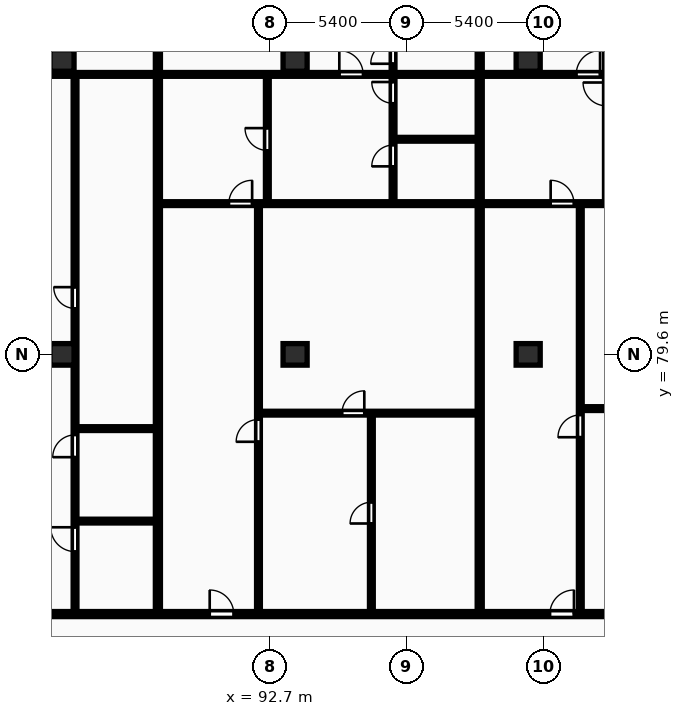
"""IFC4 building model, lengths in metres.
Left out: names, types, materials, properties, quantities, classifications, styles, units other than length and angle.
Written with IfcOpenShell. Run it as: python <this file> out.ifc"""

import sys

from ifc_helpers import new_model, si_unit, direction, frame, frame_2d, origin, origin_2d, place, context, subcontext, project, spatial, rectangle, extrude, element, fill, save


model = new_model("IFC4")
c1 = context("Model", 3, precision=1e-05, world=origin(), true_north=direction((0.0, 1.0)))
c2 = subcontext(c1, "Body", "Model", "MODEL_VIEW")
j1 = project(units=[si_unit("LENGTHUNIT", "METRE"), si_unit("PLANEANGLEUNIT", "RADIAN")], contexts=[c1])
p1 = place(None, origin())
s1 = spatial("IfcSite", under=j1, at=p1, CompositionType="ELEMENT")
p2 = place(p1, origin())
s2 = spatial("IfcBuilding", under=s1, at=p2, CompositionType="ELEMENT")
p3 = place(p2, frame((0.0, 0.0, 87.3)))
s3 = spatial("IfcBuildingStorey", under=s2, at=p3, CompositionType="ELEMENT", Elevation=87.3)
for number, where, z_axis, x_axis in (
    (1, (84.5, 79.6, 0.0), (0.0, 0.0, 1.0), (1.0, 0.0, 0.0)),
    (2, (84.5, 91.2, 0.0), (0.0, 0.0, 1.0), (1.0, 0.0, 0.0)),
    (3, (93.7, 79.6, 0.0), (0.0, 0.0, 1.0), (1.0, 0.0, 0.0)),
    (4, (93.7, 91.2, 0.0), (0.0, 0.0, 1.0), (1.0, 0.0, 0.0)),
    (5, (102.9, 79.6, 0.0), (0.0, 0.0, 1.0), (1.0, 0.0, 0.0)),
    (6, (102.9, 91.2, 0.0), (0.0, 0.0, 1.0), (1.0, 0.0, 0.0)),
):
    element("IfcColumn", number, at=place(p3, frame(where, z_axis=z_axis, x_axis=x_axis)), inside=s3, PredefinedType="COLUMN", context=c2, shape_type="SweptSolid", body=[
        extrude(rectangle(XDim=0.95, YDim=0.85, at=origin_2d()), origin(), (0.0, 0.0, 1.0), 3.25),
    ])
p4 = place(p3, frame((88.285, 69.43, 0.0), z_axis=(0.0, 0.0, 1.0), x_axis=(0.0, 1.0, 0.0)))
e7 = element("IfcWall", 7, at=p4, inside=s3, PredefinedType="PARTITIONING", context=c2, shape_type="SweptSolid", body=[
    extrude(rectangle(XDim=26.47, YDim=0.2, at=frame_2d((13.235, 0.0))), origin(), (0.0, 0.0, 1.0), 2.97),
])
for number, where, z_axis, x_axis in (
    (8, (85.075, 73.02, 0.0), (0.0, 0.0, 1.0), (1.0, 0.0, 0.0)),
    (9, (85.075, 76.67, 0.0), (0.0, 0.0, 1.0), (1.0, 0.0, 0.0)),
):
    element("IfcWall", number, at=place(p3, frame(where, z_axis=z_axis, x_axis=x_axis)), inside=s3, PredefinedType="PARTITIONING", context=c2, shape_type="SweptSolid", body=[
        extrude(rectangle(XDim=3.13, YDim=0.15, at=frame_2d((1.565, 0.0))), origin(), (0.0, 0.0, 1.0), 2.97),
    ])
p5 = place(p3, frame((85.015, 69.41, 0.0), z_axis=(0.0, 0.0, 1.0), x_axis=(0.0, 1.0, 0.0)))
e10 = element("IfcWall", 10, at=p5, inside=s3, PredefinedType="PARTITIONING", context=c2, shape_type="SweptSolid", body=[
    extrude(rectangle(XDim=21.18, YDim=0.15, at=frame_2d((10.59, 0.0))), origin(), (0.0, 0.0, 1.0), 2.97),
])
p6 = place(p5, frame((2.406, 0.0, 0.0)))
e11 = element("IfcOpeningElement", 11, at=p6, cuts=e10, PredefinedType="OPENING", context=c2, shape_type="SweptSolid", body=[
    extrude(rectangle(XDim=0.96, YDim=2.1, at=frame_2d((0.48, 1.05))), frame((0.0, 0.085, 0.0), z_axis=(0.0, -1.0, 0.0), x_axis=(1.0, 0.0, 0.0)), (0.0, 0.0, 1.0), 0.17),
])
p7 = place(p5, frame((6.133, 0.0, 0.0)))
e12 = element("IfcOpeningElement", 12, at=p7, cuts=e10, PredefinedType="OPENING", context=c2, shape_type="SweptSolid", body=[
    extrude(rectangle(XDim=0.88, YDim=2.06, at=frame_2d((0.44, 1.03))), frame((0.0, 0.085, 0.0), z_axis=(0.0, -1.0, 0.0), x_axis=(1.0, 0.0, 0.0)), (0.0, 0.0, 1.0), 0.17),
])
p8 = place(p5, frame((12.003, 0.0, 0.0)))
e13 = element("IfcOpeningElement", 13, at=p8, cuts=e10, PredefinedType="OPENING", context=c2, shape_type="SweptSolid", body=[
    extrude(rectangle(XDim=0.84, YDim=2.04, at=frame_2d((0.42, 1.02))), frame((0.0, 0.085, 0.0), z_axis=(0.0, -1.0, 0.0), x_axis=(1.0, 0.0, 0.0)), (0.0, 0.0, 1.0), 0.17),
])
p9 = place(p3, frame((69.447, 90.65, 0.0), z_axis=(0.0, 0.0, 1.0), x_axis=(1.0, 0.0, 0.0)))
e14 = element("IfcWall", 14, at=p9, inside=s3, PredefinedType="PARTITIONING", context=c2, shape_type="SweptSolid", body=[
    extrude(rectangle(XDim=18.758, YDim=0.15, at=frame_2d((9.379, 0.0))), origin(), (0.0, 0.0, 1.0), 2.97),
])
p10 = place(p9, frame((3.965, 0.0, 0.0)))
e15 = element("IfcOpeningElement", 15, at=p10, cuts=e14, PredefinedType="OPENING", context=c2, shape_type="SweptSolid", body=[
    extrude(rectangle(XDim=0.94, YDim=2.1, at=frame_2d((0.47, 1.05))), frame((0.0, 0.085, 0.0), z_axis=(0.0, -1.0, 0.0), x_axis=(1.0, 0.0, 0.0)), (0.0, 0.0, 1.0), 0.17),
])
p11 = place(p9, frame((8.909, 0.0, 0.0)))
e16 = element("IfcOpeningElement", 16, at=p11, cuts=e14, PredefinedType="OPENING", context=c2, shape_type="SweptSolid", body=[
    extrude(rectangle(XDim=0.94, YDim=2.1, at=frame_2d((0.47, 1.05))), frame((0.0, 0.085, 0.0), z_axis=(0.0, -1.0, 0.0), x_axis=(1.0, 0.0, 0.0)), (0.0, 0.0, 1.0), 0.17),
])
p12 = place(p3, frame((100.987, 69.43, 0.0), z_axis=(0.0, 0.0, 1.0), x_axis=(0.0, 1.0, 0.0)))
e17 = element("IfcWall", 17, at=p12, inside=s3, PredefinedType="PARTITIONING", context=c2, shape_type="SweptSolid", body=[
    extrude(rectangle(XDim=26.47, YDim=0.2, at=frame_2d((13.235, 0.0))), origin(), (0.0, 0.0, 1.0), 2.97),
])
p13 = place(p3, frame((96.711, 69.41, 0.0), z_axis=(0.0, 0.0, 1.0), x_axis=(0.0, 1.0, 0.0)))
e18 = element("IfcWall", 18, at=p13, inside=s3, PredefinedType="PARTITIONING", context=c2, shape_type="SweptSolid", body=[
    extrude(rectangle(XDim=7.87, YDim=0.15, at=frame_2d((3.935, 0.0))), origin(), (0.0, 0.0, 1.0), 2.97),
])
p14 = place(p13, frame((3.515, 0.0, 0.0)))
e19 = element("IfcOpeningElement", 19, at=p14, cuts=e18, PredefinedType="OPENING", context=c2, shape_type="SweptSolid", body=[
    extrude(rectangle(XDim=0.84, YDim=2.04, at=frame_2d((0.42, 1.02))), frame((0.0, 0.085, 0.0), z_axis=(0.0, -1.0, 0.0), x_axis=(1.0, 0.0, 0.0)), (0.0, 0.0, 1.0), 0.17),
])
p15 = place(p3, frame((92.315, 77.28, 0.0), z_axis=(0.0, 0.0, 1.0), x_axis=(1.0, 0.0, 0.0)))
e20 = element("IfcWall", 20, at=p15, inside=s3, PredefinedType="PARTITIONING", context=c2, shape_type="SweptSolid", body=[
    extrude(rectangle(XDim=8.593, YDim=0.15, at=frame_2d((4.296, 0.0))), origin(), (0.0, 0.0, 1.0), 2.97),
])
p16 = place(p15, frame((3.237, 0.0, 0.0)))
e21 = element("IfcOpeningElement", 21, at=p16, cuts=e20, PredefinedType="OPENING", context=c2, shape_type="SweptSolid", body=[
    extrude(rectangle(XDim=0.88, YDim=2.06, at=frame_2d((0.44, 1.03))), frame((0.0, 0.085, 0.0), z_axis=(0.0, -1.0, 0.0), x_axis=(1.0, 0.0, 0.0)), (0.0, 0.0, 1.0), 0.17),
])
p17 = place(p3, frame((92.255, 69.41, 0.0), z_axis=(0.0, 0.0, 1.0), x_axis=(0.0, 1.0, 0.0)))
e22 = element("IfcWall", 22, at=p17, inside=s3, PredefinedType="PARTITIONING", context=c2, shape_type="SweptSolid", body=[
    extrude(rectangle(XDim=16.1, YDim=0.15, at=frame_2d((8.05, 0.0))), origin(), (0.0, 0.0, 1.0), 2.97),
])
p18 = place(p17, frame((6.74, 0.0, 0.0)))
e23 = element("IfcOpeningElement", 23, at=p18, cuts=e22, PredefinedType="OPENING", context=c2, shape_type="SweptSolid", body=[
    extrude(rectangle(XDim=0.88, YDim=2.06, at=frame_2d((0.44, 1.03))), frame((0.0, 0.085, 0.0), z_axis=(0.0, -1.0, 0.0), x_axis=(1.0, 0.0, 0.0)), (0.0, 0.0, 1.0), 0.17),
])
p19 = place(p3, frame((92.604, 85.59, 0.0), z_axis=(0.0, 0.0, 1.0), x_axis=(0.0, 1.0, 0.0)))
e24 = element("IfcWall", 24, at=p19, inside=s3, PredefinedType="PARTITIONING", context=c2, shape_type="SweptSolid", body=[
    extrude(rectangle(XDim=5.0, YDim=0.15, at=frame_2d((2.5, 0.0))), origin(), (0.0, 0.0, 1.0), 2.97),
])
p20 = place(p19, frame((2.06, 0.0, 0.0)))
e25 = element("IfcOpeningElement", 25, at=p20, cuts=e24, PredefinedType="OPENING", context=c2, shape_type="SweptSolid", body=[
    extrude(rectangle(XDim=0.88, YDim=2.06, at=frame_2d((0.44, 1.03))), frame((0.0, 0.085, 0.0), z_axis=(0.0, -1.0, 0.0), x_axis=(1.0, 0.0, 0.0)), (0.0, 0.0, 1.0), 0.17),
])
p21 = place(p3, frame((97.627, 88.09, 0.0), z_axis=(0.0, 0.0, 1.0), x_axis=(1.0, 0.0, 0.0)))
e26 = element("IfcWall", 26, at=p21, inside=s3, PredefinedType="PARTITIONING", context=c2, shape_type="SweptSolid", body=[
    extrude(rectangle(XDim=3.28, YDim=0.15, at=frame_2d((1.64, 0.0))), origin(), (0.0, 0.0, 1.0), 2.97),
])
p22 = place(p3, frame((97.567, 85.59, 0.0), z_axis=(0.0, 0.0, 1.0), x_axis=(0.0, 1.0, 0.0)))
e27 = element("IfcWall", 27, at=p22, inside=s3, PredefinedType="PARTITIONING", context=c2, shape_type="SweptSolid", body=[
    extrude(rectangle(XDim=10.31, YDim=0.15, at=frame_2d((5.155, 0.0))), origin(), (0.0, 0.0, 1.0), 2.97),
])
p23 = place(p22, frame((1.43, 0.0, 0.0)))
e28 = element("IfcOpeningElement", 28, at=p23, cuts=e27, PredefinedType="OPENING", context=c2, shape_type="SweptSolid", body=[
    extrude(rectangle(XDim=0.84, YDim=2.04, at=frame_2d((0.42, 1.02))), frame((0.0, 0.085, 0.0), z_axis=(0.0, -1.0, 0.0), x_axis=(1.0, 0.0, 0.0)), (0.0, 0.0, 1.0), 0.17),
])
p24 = place(p22, frame((3.92, 0.0, 0.0)))
e29 = element("IfcOpeningElement", 29, at=p24, cuts=e27, PredefinedType="OPENING", context=c2, shape_type="SweptSolid", body=[
    extrude(rectangle(XDim=0.84, YDim=2.04, at=frame_2d((0.42, 1.02))), frame((0.0, 0.085, 0.0), z_axis=(0.0, -1.0, 0.0), x_axis=(1.0, 0.0, 0.0)), (0.0, 0.0, 1.0), 0.17),
])
p25 = place(p22, frame((5.48, 0.0, 0.0)))
e30 = element("IfcOpeningElement", 30, at=p25, cuts=e27, PredefinedType="OPENING", context=c2, shape_type="SweptSolid", body=[
    extrude(rectangle(XDim=0.88, YDim=2.06, at=frame_2d((0.44, 1.03))), frame((0.0, 0.085, 0.0), z_axis=(0.0, -1.0, 0.0), x_axis=(1.0, 0.0, 0.0)), (0.0, 0.0, 1.0), 0.17),
])
p26 = place(p3, frame((88.365, 85.55, 0.0), z_axis=(0.0, 0.0, 1.0), x_axis=(1.0, 0.0, 0.0)))
e31 = element("IfcWall", 31, at=p26, inside=s3, PredefinedType="PARTITIONING", context=c2, shape_type="SweptSolid", body=[
    extrude(rectangle(XDim=12.543, YDim=0.15, at=frame_2d((6.271, 0.0))), origin(), (0.0, 0.0, 1.0), 2.97),
])
p27 = place(p26, frame((2.72, 0.0, 0.0)))
e32 = element("IfcOpeningElement", 32, at=p27, cuts=e31, PredefinedType="OPENING", context=c2, shape_type="SweptSolid", body=[
    extrude(rectangle(XDim=0.92, YDim=2.08, at=frame_2d((0.46, 1.04))), frame((0.0, 0.085, 0.0), z_axis=(0.0, -1.0, 0.0), x_axis=(1.0, 0.0, 0.0)), (0.0, 0.0, 1.0), 0.17),
])
p28 = place(p3, frame((88.365, 90.65, 0.0), z_axis=(0.0, 0.0, 1.0), x_axis=(1.0, 0.0, 0.0)))
e33 = element("IfcWall", 33, at=p28, inside=s3, PredefinedType="PARTITIONING", context=c2, shape_type="SweptSolid", body=[
    extrude(rectangle(XDim=12.543, YDim=0.15, at=frame_2d((6.271, 0.0))), origin(), (0.0, 0.0, 1.0), 2.97),
])
p29 = place(p28, frame((7.081, 0.0, 0.0)))
e34 = element("IfcOpeningElement", 34, at=p29, cuts=e33, PredefinedType="OPENING", context=c2, shape_type="SweptSolid", body=[
    extrude(rectangle(XDim=0.94, YDim=2.1, at=frame_2d((0.47, 1.05))), frame((0.0, 0.085, 0.0), z_axis=(0.0, -1.0, 0.0), x_axis=(1.0, 0.0, 0.0)), (0.0, 0.0, 1.0), 0.17),
])
p30 = place(p3, frame((105.017, 77.46, 0.0), z_axis=(0.0, 0.0, 1.0), x_axis=(1.0, 0.0, 0.0)))
e35 = element("IfcWall", 35, at=p30, inside=s3, PredefinedType="PARTITIONING", context=c2, shape_type="SweptSolid", body=[
    extrude(rectangle(XDim=12.936, YDim=0.15, at=frame_2d((6.468, 0.0))), origin(), (0.0, 0.0, 1.0), 2.97),
])
p31 = place(p30, frame((4.464, 0.0, 0.0)))
e36 = element("IfcOpeningElement", 36, at=p31, cuts=e35, PredefinedType="OPENING", context=c2, shape_type="SweptSolid", body=[
    extrude(rectangle(XDim=0.88, YDim=2.06, at=frame_2d((0.44, 1.03))), frame((0.0, 0.085, 0.0), z_axis=(0.0, -1.0, 0.0), x_axis=(1.0, 0.0, 0.0)), (0.0, 0.0, 1.0), 0.17),
])
p32 = place(p3, frame((104.957, 69.41, 0.0), z_axis=(0.0, 0.0, 1.0), x_axis=(0.0, 1.0, 0.0)))
e37 = element("IfcWall", 37, at=p32, inside=s3, PredefinedType="PARTITIONING", context=c2, shape_type="SweptSolid", body=[
    extrude(rectangle(XDim=16.1, YDim=0.15, at=frame_2d((8.05, 0.0))), origin(), (0.0, 0.0, 1.0), 2.97),
])
p33 = place(p32, frame((6.92, 0.0, 0.0)))
e38 = element("IfcOpeningElement", 38, at=p33, cuts=e37, PredefinedType="OPENING", context=c2, shape_type="SweptSolid", body=[
    extrude(rectangle(XDim=0.88, YDim=2.06, at=frame_2d((0.44, 1.03))), frame((0.0, 0.085, 0.0), z_axis=(0.0, -1.0, 0.0), x_axis=(1.0, 0.0, 0.0)), (0.0, 0.0, 1.0), 0.17),
])
p34 = place(p3, frame((101.067, 85.55, 0.0), z_axis=(0.0, 0.0, 1.0), x_axis=(1.0, 0.0, 0.0)))
e39 = element("IfcWall", 39, at=p34, inside=s3, PredefinedType="PARTITIONING", context=c2, shape_type="SweptSolid", body=[
    extrude(rectangle(XDim=16.886, YDim=0.15, at=frame_2d((8.443, 0.0))), origin(), (0.0, 0.0, 1.0), 2.97),
])
p35 = place(p34, frame((2.72, 0.0, 0.0)))
e40 = element("IfcOpeningElement", 40, at=p35, cuts=e39, PredefinedType="OPENING", context=c2, shape_type="SweptSolid", body=[
    extrude(rectangle(XDim=0.92, YDim=2.08, at=frame_2d((0.46, 1.04))), frame((0.0, 0.085, 0.0), z_axis=(0.0, -1.0, 0.0), x_axis=(1.0, 0.0, 0.0)), (0.0, 0.0, 1.0), 0.17),
])
p36 = place(p3, frame((101.067, 90.65, 0.0), z_axis=(0.0, 0.0, 1.0), x_axis=(1.0, 0.0, 0.0)))
e41 = element("IfcWall", 41, at=p36, inside=s3, PredefinedType="PARTITIONING", context=c2, shape_type="SweptSolid", body=[
    extrude(rectangle(XDim=12.913, YDim=0.15, at=frame_2d((6.457, 0.0))), origin(), (0.0, 0.0, 1.0), 2.97),
])
p37 = place(p36, frame((3.73, 0.0, 0.0)))
e42 = element("IfcOpeningElement", 42, at=p37, cuts=e41, PredefinedType="OPENING", context=c2, shape_type="SweptSolid", body=[
    extrude(rectangle(XDim=0.94, YDim=2.1, at=frame_2d((0.47, 1.05))), frame((0.0, 0.085, 0.0), z_axis=(0.0, -1.0, 0.0), x_axis=(1.0, 0.0, 0.0)), (0.0, 0.0, 1.0), 0.17),
])
p38 = place(p36, frame((6.016, 0.0, 0.0)))
e43 = element("IfcOpeningElement", 43, at=p38, cuts=e41, PredefinedType="OPENING", context=c2, shape_type="SweptSolid", body=[
    extrude(rectangle(XDim=0.88, YDim=2.06, at=frame_2d((0.44, 1.03))), frame((0.0, 0.085, 0.0), z_axis=(0.0, -1.0, 0.0), x_axis=(1.0, 0.0, 0.0)), (0.0, 0.0, 1.0), 0.17),
])
p39 = place(p36, frame((11.813, 0.0, 0.0)))
e44 = element("IfcOpeningElement", 44, at=p39, cuts=e41, PredefinedType="OPENING", context=c2, shape_type="SweptSolid", body=[
    extrude(rectangle(XDim=0.88, YDim=2.06, at=frame_2d((0.44, 1.03))), frame((0.0, 0.085, 0.0), z_axis=(0.0, -1.0, 0.0), x_axis=(1.0, 0.0, 0.0)), (0.0, 0.0, 1.0), 0.17),
])
p40 = place(p3, frame((57.6, 69.35, 0.0), z_axis=(0.0, 0.0, 1.0), x_axis=(1.0, 0.0, 0.0)))
e45 = element("IfcWall", 45, at=p40, inside=s3, PredefinedType="PARTITIONING", context=c2, shape_type="SweptSolid", body=[
    extrude(rectangle(XDim=73.0, YDim=0.2, at=frame_2d((36.5, 0.0))), origin(), (0.0, 0.0, 1.0), 2.97),
])
p41 = place(p40, frame((0.37, 0.0, 0.0)))
e46 = element("IfcOpeningElement", 46, at=p41, cuts=e45, PredefinedType="OPENING", context=c2, shape_type="SweptSolid", body=[
    extrude(rectangle(XDim=0.95, YDim=2.15, at=frame_2d((0.475, 1.075))), frame((0.0, 0.11, 0.0), z_axis=(0.0, -1.0, 0.0), x_axis=(1.0, 0.0, 0.0)), (0.0, 0.0, 1.0), 0.22),
])
p42 = place(p40, frame((20.421, 0.0, 0.0)))
e47 = element("IfcOpeningElement", 47, at=p42, cuts=e45, PredefinedType="OPENING", context=c2, shape_type="SweptSolid", body=[
    extrude(rectangle(XDim=1.22, YDim=2.18, at=frame_2d((0.61, 1.09))), frame((0.0, 0.11, 0.0), z_axis=(0.0, -1.0, 0.0), x_axis=(1.0, 0.0, 0.0)), (0.0, 0.0, 1.0), 0.22),
])
p43 = place(p40, frame((32.729, 0.0, 0.0)))
e48 = element("IfcOpeningElement", 48, at=p43, cuts=e45, PredefinedType="OPENING", context=c2, shape_type="SweptSolid", body=[
    extrude(rectangle(XDim=0.95, YDim=2.15, at=frame_2d((0.475, 1.075))), frame((0.0, 0.11, 0.0), z_axis=(0.0, -1.0, 0.0), x_axis=(1.0, 0.0, 0.0)), (0.0, 0.0, 1.0), 0.22),
])
p44 = place(p40, frame((46.157, 0.0, 0.0)))
e49 = element("IfcOpeningElement", 49, at=p44, cuts=e45, PredefinedType="OPENING", context=c2, shape_type="SweptSolid", body=[
    extrude(rectangle(XDim=0.95, YDim=2.15, at=frame_2d((0.475, 1.075))), frame((0.0, 0.11, 0.0), z_axis=(0.0, -1.0, 0.0), x_axis=(1.0, 0.0, 0.0)), (0.0, 0.0, 1.0), 0.22),
])
p45 = place(p40, frame((60.803, 0.0, 0.0)))
e50 = element("IfcOpeningElement", 50, at=p45, cuts=e45, PredefinedType="OPENING", context=c2, shape_type="SweptSolid", body=[
    extrude(rectangle(XDim=0.95, YDim=2.15, at=frame_2d((0.475, 1.075))), frame((0.0, 0.11, 0.0), z_axis=(0.0, -1.0, 0.0), x_axis=(1.0, 0.0, 0.0)), (0.0, 0.0, 1.0), 0.22),
])
p46 = place(p6, origin())
e51 = element("IfcDoor", 51, at=p46, inside=s3, OperationType="SINGLE_SWING_RIGHT", PredefinedType="DOOR", context=c2, shape_type="SweptSolid", body=[
    extrude(rectangle(XDim=0.96, YDim=2.1, at=frame_2d((0.48, 1.05))), frame((0.0, 0.025, 0.0), z_axis=(0.0, -1.0, 0.0), x_axis=(1.0, 0.0, 0.0)), (0.0, 0.0, 1.0), 0.05),
])
fill(e11, e51)
p47 = place(p7, origin())
e52 = element("IfcDoor", 52, at=p47, inside=s3, OperationType="SINGLE_SWING_LEFT", PredefinedType="DOOR", context=c2, shape_type="SweptSolid", body=[
    extrude(rectangle(XDim=0.88, YDim=2.06, at=frame_2d((0.44, 1.03))), frame((0.0, 0.025, 0.0), z_axis=(0.0, -1.0, 0.0), x_axis=(1.0, 0.0, 0.0)), (0.0, 0.0, 1.0), 0.05),
])
fill(e12, e52)
p48 = place(p8, origin())
e53 = element("IfcDoor", 53, at=p48, inside=s3, OperationType="SINGLE_SWING_RIGHT", PredefinedType="DOOR", context=c2, shape_type="SweptSolid", body=[
    extrude(rectangle(XDim=0.84, YDim=2.04, at=frame_2d((0.42, 1.02))), frame((0.0, 0.025, 0.0), z_axis=(0.0, -1.0, 0.0), x_axis=(1.0, 0.0, 0.0)), (0.0, 0.0, 1.0), 0.05),
])
fill(e13, e53)
p49 = place(p14, origin())
e54 = element("IfcDoor", 54, at=p49, inside=s3, OperationType="SINGLE_SWING_LEFT", PredefinedType="DOOR", context=c2, shape_type="SweptSolid", body=[
    extrude(rectangle(XDim=0.84, YDim=2.04, at=frame_2d((0.42, 1.02))), frame((0.0, 0.025, 0.0), z_axis=(0.0, -1.0, 0.0), x_axis=(1.0, 0.0, 0.0)), (0.0, 0.0, 1.0), 0.05),
])
fill(e19, e54)
p50 = place(p16, origin())
e55 = element("IfcDoor", 55, at=p50, inside=s3, OperationType="SINGLE_SWING_RIGHT", PredefinedType="DOOR", context=c2, shape_type="SweptSolid", body=[
    extrude(rectangle(XDim=0.88, YDim=2.06, at=frame_2d((0.44, 1.03))), frame((0.0, 0.025, 0.0), z_axis=(0.0, -1.0, 0.0), x_axis=(1.0, 0.0, 0.0)), (0.0, 0.0, 1.0), 0.05),
])
fill(e21, e55)
p51 = place(p18, origin())
e56 = element("IfcDoor", 56, at=p51, inside=s3, OperationType="SINGLE_SWING_LEFT", PredefinedType="DOOR", context=c2, shape_type="SweptSolid", body=[
    extrude(rectangle(XDim=0.88, YDim=2.06, at=frame_2d((0.44, 1.03))), frame((0.0, 0.025, 0.0), z_axis=(0.0, -1.0, 0.0), x_axis=(1.0, 0.0, 0.0)), (0.0, 0.0, 1.0), 0.05),
])
fill(e23, e56)
p52 = place(p20, origin())
e57 = element("IfcDoor", 57, at=p52, inside=s3, OperationType="SINGLE_SWING_RIGHT", PredefinedType="DOOR", context=c2, shape_type="SweptSolid", body=[
    extrude(rectangle(XDim=0.88, YDim=2.06, at=frame_2d((0.44, 1.03))), frame((0.0, 0.025, 0.0), z_axis=(0.0, -1.0, 0.0), x_axis=(1.0, 0.0, 0.0)), (0.0, 0.0, 1.0), 0.05),
])
fill(e25, e57)
p53 = place(p23, origin())
e58 = element("IfcDoor", 58, at=p53, inside=s3, OperationType="SINGLE_SWING_LEFT", PredefinedType="DOOR", context=c2, shape_type="SweptSolid", body=[
    extrude(rectangle(XDim=0.84, YDim=2.04, at=frame_2d((0.42, 1.02))), frame((0.0, 0.025, 0.0), z_axis=(0.0, -1.0, 0.0), x_axis=(1.0, 0.0, 0.0)), (0.0, 0.0, 1.0), 0.05),
])
fill(e28, e58)
p54 = place(p24, origin())
e59 = element("IfcDoor", 59, at=p54, inside=s3, OperationType="SINGLE_SWING_RIGHT", PredefinedType="DOOR", context=c2, shape_type="SweptSolid", body=[
    extrude(rectangle(XDim=0.84, YDim=2.04, at=frame_2d((0.42, 1.02))), frame((0.0, 0.025, 0.0), z_axis=(0.0, -1.0, 0.0), x_axis=(1.0, 0.0, 0.0)), (0.0, 0.0, 1.0), 0.05),
])
fill(e29, e59)
p55 = place(p25, origin())
e60 = element("IfcDoor", 60, at=p55, inside=s3, OperationType="SINGLE_SWING_LEFT", PredefinedType="DOOR", context=c2, shape_type="SweptSolid", body=[
    extrude(rectangle(XDim=0.88, YDim=2.06, at=frame_2d((0.44, 1.03))), frame((0.0, 0.025, 0.0), z_axis=(0.0, -1.0, 0.0), x_axis=(1.0, 0.0, 0.0)), (0.0, 0.0, 1.0), 0.05),
])
fill(e30, e60)
p56 = place(p27, origin())
e61 = element("IfcDoor", 61, at=p56, inside=s3, OperationType="SINGLE_SWING_RIGHT", PredefinedType="DOOR", context=c2, shape_type="SweptSolid", body=[
    extrude(rectangle(XDim=0.92, YDim=2.08, at=frame_2d((0.46, 1.04))), frame((0.0, 0.025, 0.0), z_axis=(0.0, -1.0, 0.0), x_axis=(1.0, 0.0, 0.0)), (0.0, 0.0, 1.0), 0.05),
])
fill(e32, e61)
p57 = place(p29, origin())
e62 = element("IfcDoor", 62, at=p57, inside=s3, OperationType="SINGLE_SWING_LEFT", PredefinedType="DOOR", context=c2, shape_type="SweptSolid", body=[
    extrude(rectangle(XDim=0.94, YDim=2.1, at=frame_2d((0.47, 1.05))), frame((0.0, 0.025, 0.0), z_axis=(0.0, -1.0, 0.0), x_axis=(1.0, 0.0, 0.0)), (0.0, 0.0, 1.0), 0.05),
])
fill(e34, e62)
p58 = place(p33, origin())
e63 = element("IfcDoor", 63, at=p58, inside=s3, OperationType="SINGLE_SWING_LEFT", PredefinedType="DOOR", context=c2, shape_type="SweptSolid", body=[
    extrude(rectangle(XDim=0.88, YDim=2.06, at=frame_2d((0.44, 1.03))), frame((0.0, 0.025, 0.0), z_axis=(0.0, -1.0, 0.0), x_axis=(1.0, 0.0, 0.0)), (0.0, 0.0, 1.0), 0.05),
])
fill(e38, e63)
p59 = place(p35, origin())
e64 = element("IfcDoor", 64, at=p59, inside=s3, OperationType="SINGLE_SWING_LEFT", PredefinedType="DOOR", context=c2, shape_type="SweptSolid", body=[
    extrude(rectangle(XDim=0.92, YDim=2.08, at=frame_2d((0.46, 1.04))), frame((0.0, 0.025, 0.0), z_axis=(0.0, -1.0, 0.0), x_axis=(1.0, 0.0, 0.0)), (0.0, 0.0, 1.0), 0.05),
])
fill(e40, e64)
p60 = place(p37, origin())
e65 = element("IfcDoor", 65, at=p60, inside=s3, OperationType="SINGLE_SWING_RIGHT", PredefinedType="DOOR", context=c2, shape_type="SweptSolid", body=[
    extrude(rectangle(XDim=0.94, YDim=2.1, at=frame_2d((0.47, 1.05))), frame((0.0, 0.025, 0.0), z_axis=(0.0, -1.0, 0.0), x_axis=(1.0, 0.0, 0.0)), (0.0, 0.0, 1.0), 0.05),
])
fill(e42, e65)
p61 = place(p43, origin())
e66 = element("IfcDoor", 66, at=p61, inside=s3, OperationType="SINGLE_SWING_LEFT", PredefinedType="DOOR", context=c2, shape_type="SweptSolid", body=[
    extrude(rectangle(XDim=0.95, YDim=2.15, at=frame_2d((0.475, 1.075))), frame((0.0, 0.025, 0.0), z_axis=(0.0, -1.0, 0.0), x_axis=(1.0, 0.0, 0.0)), (0.0, 0.0, 1.0), 0.05),
])
fill(e48, e66)
p62 = place(p44, origin())
e67 = element("IfcDoor", 67, at=p62, inside=s3, OperationType="SINGLE_SWING_RIGHT", PredefinedType="DOOR", context=c2, shape_type="SweptSolid", body=[
    extrude(rectangle(XDim=0.95, YDim=2.15, at=frame_2d((0.475, 1.075))), frame((0.0, 0.025, 0.0), z_axis=(0.0, -1.0, 0.0), x_axis=(1.0, 0.0, 0.0)), (0.0, 0.0, 1.0), 0.05),
])
fill(e49, e67)
save(model, sys.argv[1])
